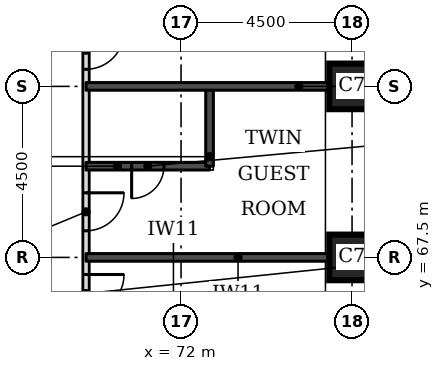
"""IFC4 building model, lengths in metres.
Left out: names, types, materials, properties, quantities, classifications, styles, units other than length and angle.
Written with IfcOpenShell. Run it as: python <this file> out.ifc"""

import sys

from ifc_helpers import new_model, si_unit, direction, frame, frame_2d, origin, origin_2d, place, context, subcontext, project, spatial, rectangle, extrude, element, fill, save


model = new_model("IFC4")
c1 = context("Model", 3, precision=1e-05, world=origin(), true_north=direction((0.0, 1.0)))
c2 = subcontext(c1, "Body", "Model", "MODEL_VIEW")
j1 = project(units=[si_unit("LENGTHUNIT", "METRE"), si_unit("PLANEANGLEUNIT", "RADIAN")], contexts=[c1])
p1 = place(None, origin())
s1 = spatial("IfcSite", under=j1, at=p1, CompositionType="ELEMENT")
p2 = place(p1, origin())
s2 = spatial("IfcBuilding", under=s1, at=p2, CompositionType="ELEMENT")
p3 = place(p2, frame((0.0, 0.0, 29.7)))
s3 = spatial("IfcBuildingStorey", under=s2, at=p3, CompositionType="ELEMENT", Elevation=29.7)
for number, where, z_axis, x_axis in (
    (1, (76.5, 67.5, 0.0), (0.0, 0.0, 1.0), (1.0, 0.0, 0.0)),
    (2, (76.5, 72.0, 0.0), (0.0, 0.0, 1.0), (1.0, 0.0, 0.0)),
):
    element("IfcColumn", number, at=place(p3, frame(where, z_axis=z_axis, x_axis=x_axis)), inside=s3, PredefinedType="COLUMN", context=c2, shape_type="SweptSolid", body=[
        extrude(rectangle(XDim=1.2, YDim=1.2, at=origin_2d()), origin(), (0.0, 0.0, 1.0), 3.3),
    ])
p4 = place(p3, frame((69.5, 47.5, 0.0), z_axis=(0.0, 0.0, 1.0), x_axis=(0.0, 1.0, 0.0)))
e3 = element("IfcWall", 3, at=p4, inside=s3, PredefinedType="PARTITIONING", context=c2, shape_type="SweptSolid", body=[
    extrude(rectangle(XDim=26.5, YDim=0.15, at=frame_2d((13.25, 0.0))), origin(), (0.0, 0.0, 1.0), 3.08),
])
p5 = place(p4, frame((24.95, 0.0, 0.0)))
e4 = element("IfcOpeningElement", 4, at=p5, cuts=e3, PredefinedType="OPENING", context=c2, shape_type="SweptSolid", body=[
    extrude(rectangle(XDim=1.0, YDim=2.1, at=frame_2d((0.5, 1.05))), frame((0.0, 0.085, 0.0), z_axis=(0.0, -1.0, 0.0), x_axis=(1.0, 0.0, 0.0)), (0.0, 0.0, 1.0), 0.17),
])
p6 = place(p4, frame((20.7, 0.0, 0.0)))
e5 = element("IfcOpeningElement", 5, at=p6, cuts=e3, PredefinedType="OPENING", context=c2, shape_type="SweptSolid", body=[
    extrude(rectangle(XDim=1.0, YDim=2.1, at=frame_2d((0.5, 1.05))), frame((0.0, 0.085, 0.0), z_axis=(0.0, -1.0, 0.0), x_axis=(1.0, 0.0, 0.0)), (0.0, 0.0, 1.0), 0.17),
])
p7 = place(p4, frame((18.55, 0.0, 0.0)))
e6 = element("IfcOpeningElement", 6, at=p7, cuts=e3, PredefinedType="OPENING", context=c2, shape_type="SweptSolid", body=[
    extrude(rectangle(XDim=1.0, YDim=2.1, at=frame_2d((0.5, 1.05))), frame((0.0, 0.085, 0.0), z_axis=(0.0, -1.0, 0.0), x_axis=(1.0, 0.0, 0.0)), (0.0, 0.0, 1.0), 0.17),
])
p8 = place(p4, frame((11.7, 0.0, 0.0)))
e7 = element("IfcOpeningElement", 7, at=p8, cuts=e3, PredefinedType="OPENING", context=c2, shape_type="SweptSolid", body=[
    extrude(rectangle(XDim=1.0, YDim=2.1, at=frame_2d((0.5, 1.05))), frame((0.0, 0.085, 0.0), z_axis=(0.0, -1.0, 0.0), x_axis=(1.0, 0.0, 0.0)), (0.0, 0.0, 1.0), 0.17),
])
p9 = place(p4, frame((7.65, 0.0, 0.0)))
e8 = element("IfcOpeningElement", 8, at=p9, cuts=e3, PredefinedType="OPENING", context=c2, shape_type="SweptSolid", body=[
    extrude(rectangle(XDim=1.1, YDim=2.1, at=frame_2d((0.55, 1.05))), frame((0.0, 0.085, 0.0), z_axis=(0.0, -1.0, 0.0), x_axis=(1.0, 0.0, 0.0)), (0.0, 0.0, 1.0), 0.17),
])
p10 = place(p4, frame((0.447, 0.0, 0.0)))
e9 = element("IfcOpeningElement", 9, at=p10, cuts=e3, PredefinedType="OPENING", context=c2, shape_type="SweptSolid", body=[
    extrude(rectangle(XDim=1.0, YDim=2.1, at=frame_2d((0.5, 1.05))), frame((0.0, 0.085, 0.0), z_axis=(0.0, -1.0, 0.0), x_axis=(1.0, 0.0, 0.0)), (0.0, 0.0, 1.0), 0.17),
])
p11 = place(p3, frame((69.5, 67.5, 0.0), z_axis=(0.0, 0.0, 1.0), x_axis=(1.0, 0.0, 0.0)))
e10 = element("IfcWall", 10, at=p11, inside=s3, PredefinedType="SOLIDWALL", context=c2, shape_type="SweptSolid", body=[
    extrude(rectangle(XDim=6.4, YDim=0.2, at=frame_2d((3.2, 0.0))), origin(), (0.0, 0.0, 1.0), 3.08),
])
p12 = place(p3, frame((69.5, 69.9, 0.0), z_axis=(0.0, 0.0, 1.0), x_axis=(1.0, 0.0, 0.0)))
e11 = element("IfcWall", 11, at=p12, inside=s3, PredefinedType="SOLIDWALL", context=c2, shape_type="SweptSolid", body=[
    extrude(rectangle(XDim=3.25, YDim=0.2, at=frame_2d((1.625, 0.0))), origin(), (0.0, 0.0, 1.0), 3.08),
])
p13 = place(p12, frame((1.2, 0.0, 0.0)))
e12 = element("IfcOpeningElement", 12, at=p13, cuts=e11, PredefinedType="OPENING", context=c2, shape_type="SweptSolid", body=[
    extrude(rectangle(XDim=0.85, YDim=2.1, at=frame_2d((0.425, 1.05))), frame((0.0, 0.11, 0.0), z_axis=(0.0, -1.0, 0.0), x_axis=(1.0, 0.0, 0.0)), (0.0, 0.0, 1.0), 0.22),
])
p14 = place(p3, frame((72.75, 69.9, 0.0), z_axis=(0.0, 0.0, 1.0), x_axis=(0.0, 1.0, 0.0)))
e13 = element("IfcWall", 13, at=p14, inside=s3, PredefinedType="SOLIDWALL", context=c2, shape_type="SweptSolid", body=[
    extrude(rectangle(XDim=2.1, YDim=0.2, at=frame_2d((1.05, 0.0))), origin(), (0.0, 0.0, 1.0), 3.08),
])
p15 = place(p3, frame((69.5, 72.0, 0.0), z_axis=(0.0, 0.0, 1.0), x_axis=(1.0, 0.0, 0.0)))
e14 = element("IfcWall", 14, at=p15, inside=s3, PredefinedType="SOLIDWALL", context=c2, shape_type="SweptSolid", body=[
    extrude(rectangle(XDim=6.4, YDim=0.2, at=frame_2d((3.2, 0.0))), origin(), (0.0, 0.0, 1.0), 3.08),
])
p16 = place(p5, frame((1.0, 0.0, 0.0), z_axis=(0.0, 0.0, 1.0), x_axis=(-1.0, 0.0, 0.0)))
e15 = element("IfcDoor", 15, at=p16, inside=s3, OperationType="SINGLE_SWING_LEFT", PredefinedType="DOOR", context=c2, shape_type="SweptSolid", body=[
    extrude(rectangle(XDim=1.0, YDim=2.1, at=frame_2d((0.5, 1.05))), frame((0.0, 0.025, 0.0), z_axis=(0.0, -1.0, 0.0), x_axis=(1.0, 0.0, 0.0)), (0.0, 0.0, 1.0), 0.05),
])
fill(e4, e15)
p17 = place(p6, frame((1.0, 0.0, 0.0), z_axis=(0.0, 0.0, 1.0), x_axis=(-1.0, 0.0, 0.0)))
e16 = element("IfcDoor", 16, at=p17, inside=s3, OperationType="SINGLE_SWING_LEFT", PredefinedType="DOOR", context=c2, shape_type="SweptSolid", body=[
    extrude(rectangle(XDim=1.0, YDim=2.1, at=frame_2d((0.5, 1.05))), frame((0.0, 0.025, 0.0), z_axis=(0.0, -1.0, 0.0), x_axis=(1.0, 0.0, 0.0)), (0.0, 0.0, 1.0), 0.05),
])
fill(e5, e16)
p18 = place(p13, frame((0.85, 0.0, 0.0), z_axis=(0.0, 0.0, 1.0), x_axis=(-1.0, 0.0, 0.0)))
e17 = element("IfcDoor", 17, at=p18, inside=s3, OperationType="SINGLE_SWING_RIGHT", PredefinedType="DOOR", context=c2, shape_type="SweptSolid", body=[
    extrude(rectangle(XDim=0.85, YDim=2.1, at=frame_2d((0.425, 1.05))), frame((0.0, 0.025, 0.0), z_axis=(0.0, -1.0, 0.0), x_axis=(1.0, 0.0, 0.0)), (0.0, 0.0, 1.0), 0.05),
])
fill(e12, e17)
p19 = place(p7, frame((1.0, 0.0, 0.0), z_axis=(0.0, 0.0, 1.0), x_axis=(-1.0, 0.0, 0.0)))
e18 = element("IfcDoor", 18, at=p19, inside=s3, OperationType="SINGLE_SWING_LEFT", PredefinedType="DOOR", context=c2, shape_type="SweptSolid", body=[
    extrude(rectangle(XDim=1.0, YDim=2.1, at=frame_2d((0.5, 1.05))), frame((0.0, 0.025, 0.0), z_axis=(0.0, -1.0, 0.0), x_axis=(1.0, 0.0, 0.0)), (0.0, 0.0, 1.0), 0.05),
])
fill(e6, e18)
save(model, sys.argv[1])
